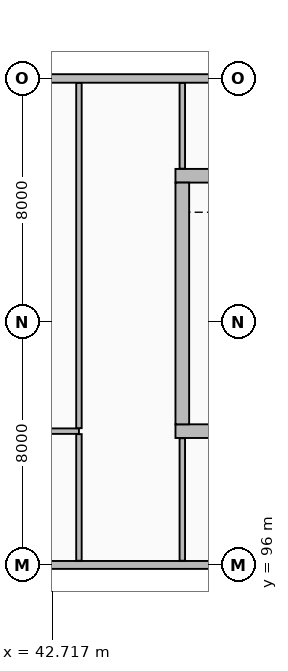
"""IFC4 building model, lengths in metres.
Left out: names, types, materials, properties, quantities, classifications, styles, units other than length and angle.
Written with IfcOpenShell. Run it as: python <this file> out.ifc"""

import sys

from ifc_helpers import new_model, si_unit, direction, frame, frame_2d, origin, place, context, subcontext, project, spatial, rectangle, extrude, element, fill, save


model = new_model("IFC4")
c1 = context("Model", 3, precision=1e-05, world=origin(), true_north=direction((0.0, 1.0)))
c2 = subcontext(c1, "Body", "Model", "MODEL_VIEW")
j1 = project(units=[si_unit("LENGTHUNIT", "METRE"), si_unit("PLANEANGLEUNIT", "RADIAN")], contexts=[c1])
p1 = place(None, origin())
s1 = spatial("IfcSite", under=j1, at=p1, CompositionType="ELEMENT")
p2 = place(p1, origin())
s2 = spatial("IfcBuilding", under=s1, at=p2, CompositionType="ELEMENT")
p3 = place(p2, frame((0.0, 0.0, 29.1)))
s3 = spatial("IfcBuildingStorey", under=s2, at=p3, CompositionType="ELEMENT", Elevation=29.1)
p4 = place(p3, frame((46.775, 100.4, 0.0), z_axis=(0.0, 0.0, 1.0), x_axis=(1.0, 0.0, 0.0)))
e1 = element("IfcWall", 1, at=p4, inside=s3, PredefinedType="SHEAR", context=c2, shape_type="SweptSolid", body=[
    extrude(rectangle(XDim=15.25, YDim=0.45, at=frame_2d((7.625, 0.0))), origin(), (0.0, 0.0, 1.0), 4.2),
])
p5 = place(p4, frame((0.975, 0.0, 0.0)))
e2 = element("IfcOpeningElement", 2, at=p5, cuts=e1, PredefinedType="OPENING", context=c2, shape_type="SweptSolid", body=[
    extrude(rectangle(XDim=1.15, YDim=2.25, at=frame_2d((0.575, 1.125))), frame((0.0, 0.235, 0.0), z_axis=(0.0, -1.0, 0.0), x_axis=(1.0, 0.0, 0.0)), (0.0, 0.0, 1.0), 0.47),
])
p6 = place(p4, frame((10.258, 0.0, 0.0)))
e3 = element("IfcOpeningElement", 3, at=p6, cuts=e1, PredefinedType="OPENING", context=c2, shape_type="SweptSolid", body=[
    extrude(rectangle(XDim=1.1, YDim=2.2, at=frame_2d((0.55, 1.1))), frame((0.0, 0.235, 0.0), z_axis=(0.0, -1.0, 0.0), x_axis=(1.0, 0.0, 0.0)), (0.0, 0.0, 1.0), 0.47),
])
p7 = place(p4, frame((12.972, 0.0, 0.0)))
e4 = element("IfcOpeningElement", 4, at=p7, cuts=e1, PredefinedType="OPENING", context=c2, shape_type="SweptSolid", body=[
    extrude(rectangle(XDim=1.1, YDim=2.2, at=frame_2d((0.55, 1.1))), frame((0.0, 0.235, 0.0), z_axis=(0.0, -1.0, 0.0), x_axis=(1.0, 0.0, 0.0)), (0.0, 0.0, 1.0), 0.47),
])
p8 = place(p3, frame((46.775, 108.8, 0.0), z_axis=(0.0, 0.0, 1.0), x_axis=(1.0, 0.0, 0.0)))
e5 = element("IfcWall", 5, at=p8, inside=s3, PredefinedType="SHEAR", context=c2, shape_type="SweptSolid", body=[
    extrude(rectangle(XDim=15.25, YDim=0.45, at=frame_2d((7.625, 0.0))), origin(), (0.0, 0.0, 1.0), 4.2),
])
p9 = place(p3, frame((47.0, 100.625, 0.0), z_axis=(0.0, 0.0, 1.0), x_axis=(0.0, 1.0, 0.0)))
e6 = element("IfcWall", 6, at=p9, inside=s3, PredefinedType="SHEAR", context=c2, shape_type="SweptSolid", body=[
    extrude(rectangle(XDim=7.95, YDim=0.45, at=frame_2d((3.975, 0.0))), origin(), (0.0, 0.0, 1.0), 4.2),
])
p10 = place(p3, frame((40.68, 96.0, 0.0), z_axis=(0.0, 0.0, 1.0), x_axis=(1.0, 0.0, 0.0)))
e7 = element("IfcWall", 7, at=p10, inside=s3, PredefinedType="SOLIDWALL", context=c2, shape_type="SweptSolid", body=[
    extrude(rectangle(XDim=16.11, YDim=0.26, at=frame_2d((8.055, 0.0))), origin(), (0.0, 0.0, 1.0), 3.402),
])
p11 = place(p3, frame((51.3, 112.0, 0.0), z_axis=(0.0, 0.0, 1.0), x_axis=(-1.0, 0.0, 0.0)))
e8 = element("IfcWall", 8, at=p11, inside=s3, PredefinedType="SOLIDWALL", context=c2, shape_type="SweptSolid", body=[
    extrude(rectangle(XDim=10.8, YDim=0.28, at=frame_2d((5.4, 0.0))), origin(), (0.0, 0.0, 1.0), 3.402),
])
p12 = place(p11, frame((4.95, 0.0, 0.95)))
e9 = element("IfcOpeningElement", 9, at=p12, cuts=e8, PredefinedType="OPENING", context=c2, shape_type="SweptSolid", body=[
    extrude(rectangle(XDim=0.9, YDim=1.8, at=frame_2d((0.45, 0.9))), frame((0.0, 0.15, 0.0), z_axis=(0.0, -1.0, 0.0), x_axis=(1.0, 0.0, 0.0)), (0.0, 0.0, 1.0), 0.3),
])
p13 = place(p3, frame((39.5, 100.4, 0.0), z_axis=(0.0, 0.0, 1.0), x_axis=(1.0, 0.0, 0.0)))
e10 = element("IfcWall", 10, at=p13, inside=s3, PredefinedType="PARTITIONING", context=c2, shape_type="SweptSolid", body=[
    extrude(rectangle(XDim=4.1, YDim=0.18, at=frame_2d((2.05, 0.0))), origin(), (0.0, 0.0, 1.0), 3.96),
])
p14 = place(p3, frame((43.6, 96.138, 0.0), z_axis=(0.0, 0.0, 1.0), x_axis=(0.0, 1.0, 0.0)))
e11 = element("IfcWall", 11, at=p14, inside=s3, PredefinedType="PARTITIONING", context=c2, shape_type="SweptSolid", body=[
    extrude(rectangle(XDim=4.164, YDim=0.18, at=frame_2d((2.082, 0.0))), origin(), (0.0, 0.0, 1.0), 3.96),
])
p15 = place(p14, frame((1.532, 0.0, 0.0)))
e12 = element("IfcOpeningElement", 12, at=p15, cuts=e11, PredefinedType="OPENING", context=c2, shape_type="SweptSolid", body=[
    extrude(rectangle(XDim=1.1, YDim=2.2, at=frame_2d((0.55, 1.1))), frame((0.0, 0.1, 0.0), z_axis=(0.0, -1.0, 0.0), x_axis=(1.0, 0.0, 0.0)), (0.0, 0.0, 1.0), 0.2),
])
p16 = place(p3, frame((43.6, 100.498, 0.0), z_axis=(0.0, 0.0, 1.0), x_axis=(0.0, 1.0, 0.0)))
e13 = element("IfcWall", 13, at=p16, inside=s3, PredefinedType="PARTITIONING", context=c2, shape_type="SweptSolid", body=[
    extrude(rectangle(XDim=11.354, YDim=0.18, at=frame_2d((5.677, 0.0))), origin(), (0.0, 0.0, 1.0), 3.96),
])
p17 = place(p16, frame((5.177, 0.0, 0.0)))
e14 = element("IfcOpeningElement", 14, at=p17, cuts=e13, PredefinedType="OPENING", context=c2, shape_type="SweptSolid", body=[
    extrude(rectangle(XDim=1.0, YDim=2.2, at=frame_2d((0.5, 1.1))), frame((0.0, 0.1, 0.0), z_axis=(0.0, -1.0, 0.0), x_axis=(1.0, 0.0, 0.0)), (0.0, 0.0, 1.0), 0.2),
])
p18 = place(p3, frame((47.0, 96.138, 0.0), z_axis=(0.0, 0.0, 1.0), x_axis=(0.0, 1.0, 0.0)))
e15 = element("IfcWall", 15, at=p18, inside=s3, PredefinedType="PARTITIONING", context=c2, shape_type="SweptSolid", body=[
    extrude(rectangle(XDim=4.029, YDim=0.18, at=frame_2d((2.015, 0.0))), origin(), (0.0, 0.0, 1.0), 3.96),
])
p19 = place(p18, frame((1.465, 0.0, 0.0)))
e16 = element("IfcOpeningElement", 16, at=p19, cuts=e15, PredefinedType="OPENING", context=c2, shape_type="SweptSolid", body=[
    extrude(rectangle(XDim=1.1, YDim=2.2, at=frame_2d((0.55, 1.1))), frame((0.0, 0.1, 0.0), z_axis=(0.0, -1.0, 0.0), x_axis=(1.0, 0.0, 0.0)), (0.0, 0.0, 1.0), 0.2),
])
p20 = place(p3, frame((47.0, 109.033, 0.0), z_axis=(0.0, 0.0, 1.0), x_axis=(0.0, 1.0, 0.0)))
e17 = element("IfcWall", 17, at=p20, inside=s3, PredefinedType="PARTITIONING", context=c2, shape_type="SweptSolid", body=[
    extrude(rectangle(XDim=2.819, YDim=0.18, at=frame_2d((1.41, 0.0))), origin(), (0.0, 0.0, 1.0), 3.96),
])
p21 = place(p20, frame((0.86, 0.0, 0.0)))
e18 = element("IfcOpeningElement", 18, at=p21, cuts=e17, PredefinedType="OPENING", context=c2, shape_type="SweptSolid", body=[
    extrude(rectangle(XDim=1.1, YDim=2.2, at=frame_2d((0.55, 1.1))), frame((0.0, 0.1, 0.0), z_axis=(0.0, -1.0, 0.0), x_axis=(1.0, 0.0, 0.0)), (0.0, 0.0, 1.0), 0.2),
])
p22 = place(p12, origin())
e19 = element("IfcWindow", 19, at=p22, inside=s3, PartitioningType="SINGLE_PANEL", PredefinedType="WINDOW", context=c2, shape_type="SweptSolid", body=[
    extrude(rectangle(XDim=0.9, YDim=1.8, at=frame_2d((0.45, 0.9))), frame((0.0, 0.03, 0.0), z_axis=(0.0, -1.0, 0.0), x_axis=(1.0, 0.0, 0.0)), (0.0, 0.0, 1.0), 0.06),
])
fill(e9, e19)
p23 = place(p5, origin())
e20 = element("IfcDoor", 20, at=p23, inside=s3, OperationType="SINGLE_SWING_RIGHT", PredefinedType="DOOR", context=c2, shape_type="SweptSolid", body=[
    extrude(rectangle(XDim=1.15, YDim=2.25, at=frame_2d((0.575, 1.125))), frame((0.0, 0.025, 0.0), z_axis=(0.0, -1.0, 0.0), x_axis=(1.0, 0.0, 0.0)), (0.0, 0.0, 1.0), 0.05),
])
fill(e2, e20)
p24 = place(p15, origin())
e21 = element("IfcDoor", 21, at=p24, inside=s3, OperationType="SINGLE_SWING_RIGHT", PredefinedType="DOOR", context=c2, shape_type="SweptSolid", body=[
    extrude(rectangle(XDim=1.1, YDim=2.2, at=frame_2d((0.55, 1.1))), frame((0.0, 0.025, 0.0), z_axis=(0.0, -1.0, 0.0), x_axis=(1.0, 0.0, 0.0)), (0.0, 0.0, 1.0), 0.05),
])
fill(e12, e21)
p25 = place(p17, origin())
e22 = element("IfcDoor", 22, at=p25, inside=s3, OperationType="SINGLE_SWING_LEFT", PredefinedType="DOOR", context=c2, shape_type="SweptSolid", body=[
    extrude(rectangle(XDim=1.0, YDim=2.2, at=frame_2d((0.5, 1.1))), frame((0.0, 0.025, 0.0), z_axis=(0.0, -1.0, 0.0), x_axis=(1.0, 0.0, 0.0)), (0.0, 0.0, 1.0), 0.05),
])
fill(e14, e22)
p26 = place(p19, origin())
e23 = element("IfcDoor", 23, at=p26, inside=s3, OperationType="SINGLE_SWING_RIGHT", PredefinedType="DOOR", context=c2, shape_type="SweptSolid", body=[
    extrude(rectangle(XDim=1.1, YDim=2.2, at=frame_2d((0.55, 1.1))), frame((0.0, 0.025, 0.0), z_axis=(0.0, -1.0, 0.0), x_axis=(1.0, 0.0, 0.0)), (0.0, 0.0, 1.0), 0.05),
])
fill(e16, e23)
p27 = place(p21, frame((1.1, 0.0, 0.0), z_axis=(0.0, 0.0, 1.0), x_axis=(-1.0, 0.0, 0.0)))
e24 = element("IfcDoor", 24, at=p27, inside=s3, OperationType="SINGLE_SWING_LEFT", PredefinedType="DOOR", context=c2, shape_type="SweptSolid", body=[
    extrude(rectangle(XDim=1.1, YDim=2.2, at=frame_2d((0.55, 1.1))), frame((0.0, 0.025, 0.0), z_axis=(0.0, -1.0, 0.0), x_axis=(1.0, 0.0, 0.0)), (0.0, 0.0, 1.0), 0.05),
])
fill(e18, e24)
save(model, sys.argv[1])
